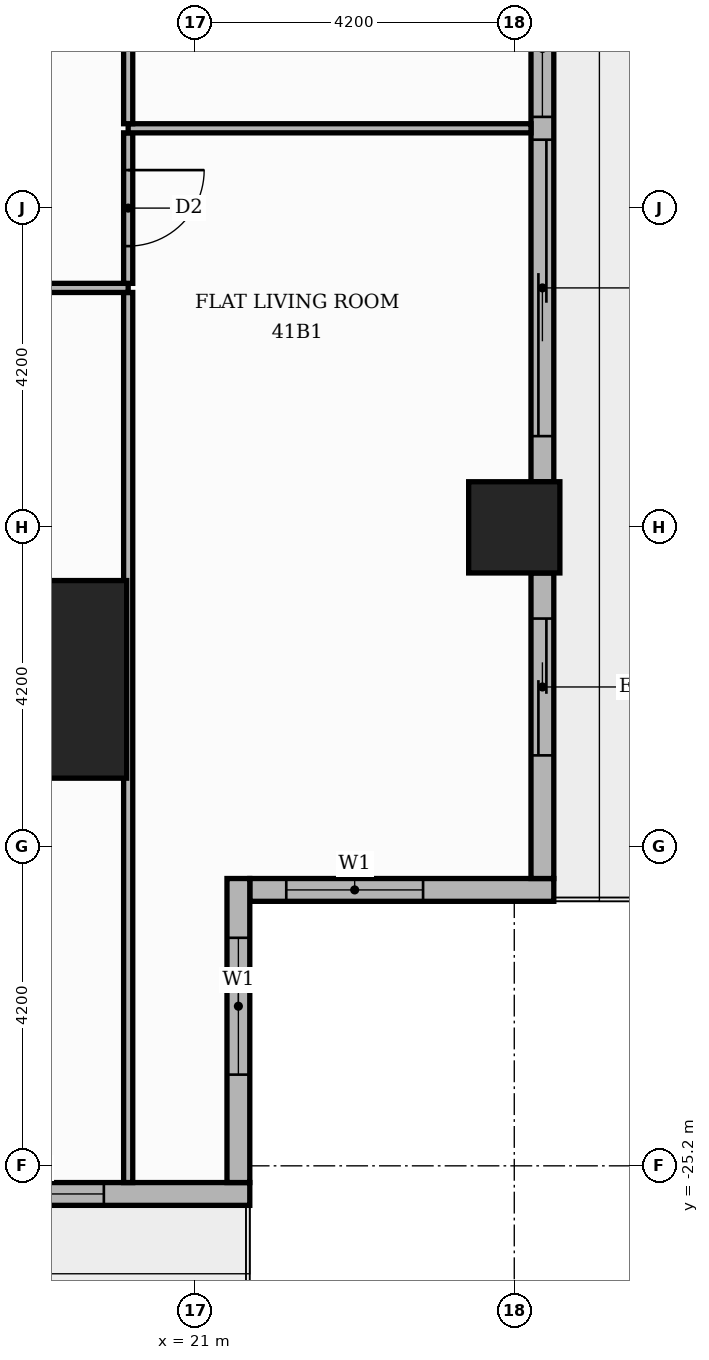
"""IFC4 building model, lengths in metres.
Left out: names, types, materials, properties, quantities, classifications, styles, units other than length and angle.
Written with IfcOpenShell. Run it as: python <this file> out.ifc"""

import sys

from ifc_helpers import new_model, si_unit, direction, frame, frame_2d, origin, origin_2d, place, context, subcontext, project, spatial, rectangle, extrude, element, fill, save


model = new_model("IFC4")
c1 = context("Model", 3, precision=1e-05, world=origin(), true_north=direction((0.0, 1.0)))
c2 = subcontext(c1, "Body", "Model", "MODEL_VIEW")
j1 = project(units=[si_unit("LENGTHUNIT", "METRE"), si_unit("PLANEANGLEUNIT", "RADIAN")], contexts=[c1])
p1 = place(None, origin())
s1 = spatial("IfcSite", under=j1, at=p1, CompositionType="ELEMENT")
p2 = place(p1, origin())
s2 = spatial("IfcBuilding", under=s1, at=p2, CompositionType="ELEMENT")
p3 = place(p2, frame((0.0, 0.0, 172.8)))
s3 = spatial("IfcBuildingStorey", under=s2, at=p3, CompositionType="ELEMENT", Elevation=172.8)
p4 = place(p3, frame((18.8, -18.8, 0.0), z_axis=(0.0, 0.0, 1.0), x_axis=(1.0, 0.0, 0.0)))
e1 = element("IfcColumn", 1, at=p4, inside=s3, PredefinedType="COLUMN", context=c2, shape_type="SweptSolid", body=[
    extrude(rectangle(XDim=2.6, YDim=2.6, at=origin_2d()), origin(), (0.0, 0.0, 1.0), 3.9),
])
p5 = place(p3, frame((25.2, -16.8, 0.0), z_axis=(0.0, 0.0, 1.0), x_axis=(1.0, 0.0, 0.0)))
e2 = element("IfcColumn", 2, at=p5, inside=s3, PredefinedType="COLUMN", context=c2, shape_type="SweptSolid", body=[
    extrude(rectangle(XDim=1.2, YDim=1.2, at=origin_2d()), origin(), (0.0, 0.0, 1.0), 3.9),
])
p6 = place(p3, frame((21.72, -21.57, 0.0), z_axis=(0.0, 0.0, 1.0), x_axis=(1.0, 0.0, 0.0)))
e3 = element("IfcWall", 3, at=p6, inside=s3, PredefinedType="STANDARD", context=c2, shape_type="SweptSolid", body=[
    extrude(rectangle(XDim=4.0, YDim=0.3, at=frame_2d((2.0, 0.0))), origin(), (0.0, 0.0, 1.0), 3.48),
])
p7 = place(p6, frame((0.48, 0.0, 0.9)))
e4 = element("IfcOpeningElement", 4, at=p7, cuts=e3, PredefinedType="OPENING", context=c2, shape_type="SweptSolid", body=[
    extrude(rectangle(XDim=1.8, YDim=2.1, at=frame_2d((0.9, 1.05))), frame((0.0, 0.16, 0.0), z_axis=(0.0, -1.0, 0.0), x_axis=(1.0, 0.0, 0.0)), (0.0, 0.0, 1.0), 0.32),
])
p8 = place(p3, frame((25.57, -21.42, 0.0), z_axis=(0.0, 0.0, 1.0), x_axis=(0.0, 1.0, 0.0)))
e5 = element("IfcWall", 5, at=p8, inside=s3, PredefinedType="STANDARD", context=c2, shape_type="SweptSolid", body=[
    extrude(rectangle(XDim=4.02, YDim=0.3, at=frame_2d((2.01, 0.0))), origin(), (0.0, 0.0, 1.0), 3.48),
])
p9 = place(p8, frame((1.62, 0.0, 0.0)))
e6 = element("IfcOpeningElement", 6, at=p9, cuts=e5, PredefinedType="OPENING", context=c2, shape_type="SweptSolid", body=[
    extrude(rectangle(XDim=1.8, YDim=2.4, at=frame_2d((0.9, 1.2))), frame((0.0, 0.16, 0.0), z_axis=(0.0, -1.0, 0.0), x_axis=(1.0, 0.0, 0.0)), (0.0, 0.0, 1.0), 0.32),
])
p10 = place(p3, frame((25.57, -16.2, 0.0), z_axis=(0.0, 0.0, 1.0), x_axis=(0.0, 1.0, 0.0)))
e7 = element("IfcWall", 7, at=p10, inside=s3, PredefinedType="STANDARD", context=c2, shape_type="SweptSolid", body=[
    extrude(rectangle(XDim=7.2, YDim=0.3, at=frame_2d((3.6, 0.0))), origin(), (0.0, 0.0, 1.0), 3.48),
])
p11 = place(p10, frame((0.6, 0.0, 0.0)))
e8 = element("IfcOpeningElement", 8, at=p11, cuts=e7, PredefinedType="OPENING", context=c2, shape_type="SweptSolid", body=[
    extrude(rectangle(XDim=3.9, YDim=2.4, at=frame_2d((1.95, 1.2))), frame((0.0, 0.16, 0.0), z_axis=(0.0, -1.0, 0.0), x_axis=(1.0, 0.0, 0.0)), (0.0, 0.0, 1.0), 0.32),
])
p12 = place(p10, frame((4.8, 0.0, 0.9)))
e9 = element("IfcOpeningElement", 9, at=p12, cuts=e7, PredefinedType="OPENING", context=c2, shape_type="SweptSolid", body=[
    extrude(rectangle(XDim=1.8, YDim=2.1, at=frame_2d((0.9, 1.05))), frame((0.0, 0.16, 0.0), z_axis=(0.0, -1.0, 0.0), x_axis=(1.0, 0.0, 0.0)), (0.0, 0.0, 1.0), 0.32),
])
p13 = place(p3, frame((17.4, -25.57, 0.0), z_axis=(0.0, 0.0, 1.0), x_axis=(1.0, 0.0, 0.0)))
e10 = element("IfcWall", 10, at=p13, inside=s3, PredefinedType="STANDARD", context=c2, shape_type="SweptSolid", body=[
    extrude(rectangle(XDim=4.32, YDim=0.3, at=frame_2d((2.16, 0.0))), origin(), (0.0, 0.0, 1.0), 3.48),
])
p14 = place(p13, frame((0.6, 0.0, 0.9)))
e11 = element("IfcOpeningElement", 11, at=p14, cuts=e10, PredefinedType="OPENING", context=c2, shape_type="SweptSolid", body=[
    extrude(rectangle(XDim=1.8, YDim=2.1, at=frame_2d((0.9, 1.05))), frame((0.0, 0.16, 0.0), z_axis=(0.0, -1.0, 0.0), x_axis=(1.0, 0.0, 0.0)), (0.0, 0.0, 1.0), 0.32),
])
p15 = place(p3, frame((21.57, -25.42, 0.0), z_axis=(0.0, 0.0, 1.0), x_axis=(0.0, 1.0, 0.0)))
e12 = element("IfcWall", 12, at=p15, inside=s3, PredefinedType="STANDARD", context=c2, shape_type="SweptSolid", body=[
    extrude(rectangle(XDim=4.0, YDim=0.3, at=frame_2d((2.0, 0.0))), origin(), (0.0, 0.0, 1.0), 3.48),
])
p16 = place(p15, frame((1.42, 0.0, 0.9)))
e13 = element("IfcOpeningElement", 13, at=p16, cuts=e12, PredefinedType="OPENING", context=c2, shape_type="SweptSolid", body=[
    extrude(rectangle(XDim=1.8, YDim=2.1, at=frame_2d((0.9, 1.05))), frame((0.0, 0.16, 0.0), z_axis=(0.0, -1.0, 0.0), x_axis=(1.0, 0.0, 0.0)), (0.0, 0.0, 1.0), 0.32),
])
p17 = place(p3, frame((20.12, -25.42, 0.0), z_axis=(0.0, 0.0, 1.0), x_axis=(0.0, 1.0, 0.0)))
e14 = element("IfcWall", 14, at=p17, inside=s3, PredefinedType="PARTITIONING", context=c2, shape_type="SweptSolid", body=[
    extrude(rectangle(XDim=11.71, YDim=0.12, at=frame_2d((5.855, 0.0))), origin(), (0.0, 0.0, 1.0), 3.48),
])
p18 = place(p3, frame((13.65, -13.65, 0.0), z_axis=(0.0, 0.0, 1.0), x_axis=(1.0, 0.0, 0.0)))
e15 = element("IfcWall", 15, at=p18, inside=s3, PredefinedType="PARTITIONING", context=c2, shape_type="SweptSolid", body=[
    extrude(rectangle(XDim=6.47, YDim=0.12, at=frame_2d((3.235, 0.0))), origin(), (0.0, 0.0, 1.0), 3.48),
])
p19 = place(p18, frame((2.785, 0.0, 0.0)))
e16 = element("IfcOpeningElement", 16, at=p19, cuts=e15, PredefinedType="OPENING", context=c2, shape_type="SweptSolid", body=[
    extrude(rectangle(XDim=0.9, YDim=2.1, at=frame_2d((0.45, 1.05))), frame((0.0, 0.07, 0.0), z_axis=(0.0, -1.0, 0.0), x_axis=(1.0, 0.0, 0.0)), (0.0, 0.0, 1.0), 0.14),
])
p20 = place(p3, frame((20.12, -13.59, 0.0), z_axis=(0.0, 0.0, 1.0), x_axis=(0.0, 1.0, 0.0)))
e17 = element("IfcWall", 17, at=p20, inside=s3, PredefinedType="PARTITIONING", context=c2, shape_type="SweptSolid", body=[
    extrude(rectangle(XDim=1.98, YDim=0.12, at=frame_2d((0.99, 0.0))), origin(), (0.0, 0.0, 1.0), 3.48),
])
p21 = place(p20, frame((0.49, 0.0, 0.0)))
e18 = element("IfcOpeningElement", 18, at=p21, cuts=e17, PredefinedType="OPENING", context=c2, shape_type="SweptSolid", body=[
    extrude(rectangle(XDim=1.0, YDim=2.1, at=frame_2d((0.5, 1.05))), frame((0.0, 0.07, 0.0), z_axis=(0.0, -1.0, 0.0), x_axis=(1.0, 0.0, 0.0)), (0.0, 0.0, 1.0), 0.14),
])
p22 = place(p3, frame((20.12, -11.55, 0.0), z_axis=(0.0, 0.0, 1.0), x_axis=(1.0, 0.0, 0.0)))
e19 = element("IfcWall", 19, at=p22, inside=s3, PredefinedType="PARTITIONING", context=c2, shape_type="SweptSolid", body=[
    extrude(rectangle(XDim=5.3, YDim=0.12, at=frame_2d((2.65, 0.0))), origin(), (0.0, 0.0, 1.0), 3.48),
])
p23 = place(p3, frame((20.12, -11.49, 0.0), z_axis=(0.0, 0.0, 1.0), x_axis=(0.0, 1.0, 0.0)))
e20 = element("IfcWall", 20, at=p23, inside=s3, PredefinedType="PARTITIONING", context=c2, shape_type="SweptSolid", body=[
    extrude(rectangle(XDim=4.08, YDim=0.12, at=frame_2d((2.04, 0.0))), origin(), (0.0, 0.0, 1.0), 3.48),
])
p24 = place(p23, frame((1.59, 0.0, 0.0)))
e21 = element("IfcOpeningElement", 21, at=p24, cuts=e20, PredefinedType="OPENING", context=c2, shape_type="SweptSolid", body=[
    extrude(rectangle(XDim=0.9, YDim=2.1, at=frame_2d((0.45, 1.05))), frame((0.0, 0.07, 0.0), z_axis=(0.0, -1.0, 0.0), x_axis=(1.0, 0.0, 0.0)), (0.0, 0.0, 1.0), 0.14),
])
p25 = place(p7, origin())
e22 = element("IfcWindow", 22, at=p25, inside=s3, PartitioningType="SINGLE_PANEL", PredefinedType="WINDOW", context=c2, shape_type="SweptSolid", body=[
    extrude(rectangle(XDim=1.8, YDim=2.1, at=frame_2d((0.9, 1.05))), frame((0.0, 0.03, 0.0), z_axis=(0.0, -1.0, 0.0), x_axis=(1.0, 0.0, 0.0)), (0.0, 0.0, 1.0), 0.06),
])
fill(e4, e22)
p26 = place(p9, origin())
e23 = element("IfcDoor", 23, at=p26, inside=s3, OperationType="SLIDING_TO_RIGHT", PredefinedType="DOOR", context=c2, shape_type="SweptSolid", body=[
    extrude(rectangle(XDim=1.8, YDim=2.4, at=frame_2d((0.9, 1.2))), frame((0.0, 0.025, 0.0), z_axis=(0.0, -1.0, 0.0), x_axis=(1.0, 0.0, 0.0)), (0.0, 0.0, 1.0), 0.05),
])
fill(e6, e23)
p27 = place(p11, origin())
e24 = element("IfcDoor", 24, at=p27, inside=s3, OperationType="SLIDING_TO_LEFT", PredefinedType="DOOR", context=c2, shape_type="SweptSolid", body=[
    extrude(rectangle(XDim=3.9, YDim=2.4, at=frame_2d((1.95, 1.2))), frame((0.0, 0.025, 0.0), z_axis=(0.0, -1.0, 0.0), x_axis=(1.0, 0.0, 0.0)), (0.0, 0.0, 1.0), 0.05),
])
fill(e8, e24)
p28 = place(p12, origin())
e25 = element("IfcWindow", 25, at=p28, inside=s3, PartitioningType="SINGLE_PANEL", PredefinedType="WINDOW", context=c2, shape_type="SweptSolid", body=[
    extrude(rectangle(XDim=1.8, YDim=2.1, at=frame_2d((0.9, 1.05))), frame((0.0, 0.03, 0.0), z_axis=(0.0, -1.0, 0.0), x_axis=(1.0, 0.0, 0.0)), (0.0, 0.0, 1.0), 0.06),
])
fill(e9, e25)
p29 = place(p14, origin())
e26 = element("IfcWindow", 26, at=p29, inside=s3, PartitioningType="SINGLE_PANEL", PredefinedType="WINDOW", context=c2, shape_type="SweptSolid", body=[
    extrude(rectangle(XDim=1.8, YDim=2.1, at=frame_2d((0.9, 1.05))), frame((0.0, 0.03, 0.0), z_axis=(0.0, -1.0, 0.0), x_axis=(1.0, 0.0, 0.0)), (0.0, 0.0, 1.0), 0.06),
])
fill(e11, e26)
p30 = place(p16, origin())
e27 = element("IfcWindow", 27, at=p30, inside=s3, PartitioningType="SINGLE_PANEL", PredefinedType="WINDOW", context=c2, shape_type="SweptSolid", body=[
    extrude(rectangle(XDim=1.8, YDim=2.1, at=frame_2d((0.9, 1.05))), frame((0.0, 0.03, 0.0), z_axis=(0.0, -1.0, 0.0), x_axis=(1.0, 0.0, 0.0)), (0.0, 0.0, 1.0), 0.06),
])
fill(e13, e27)
p31 = place(p21, frame((1.0, 0.0, 0.0), z_axis=(0.0, 0.0, 1.0), x_axis=(-1.0, 0.0, 0.0)))
e28 = element("IfcDoor", 28, at=p31, inside=s3, OperationType="SINGLE_SWING_RIGHT", PredefinedType="DOOR", context=c2, shape_type="SweptSolid", body=[
    extrude(rectangle(XDim=1.0, YDim=2.1, at=frame_2d((0.5, 1.05))), frame((0.0, 0.025, 0.0), z_axis=(0.0, -1.0, 0.0), x_axis=(1.0, 0.0, 0.0)), (0.0, 0.0, 1.0), 0.05),
])
fill(e18, e28)
save(model, sys.argv[1])
